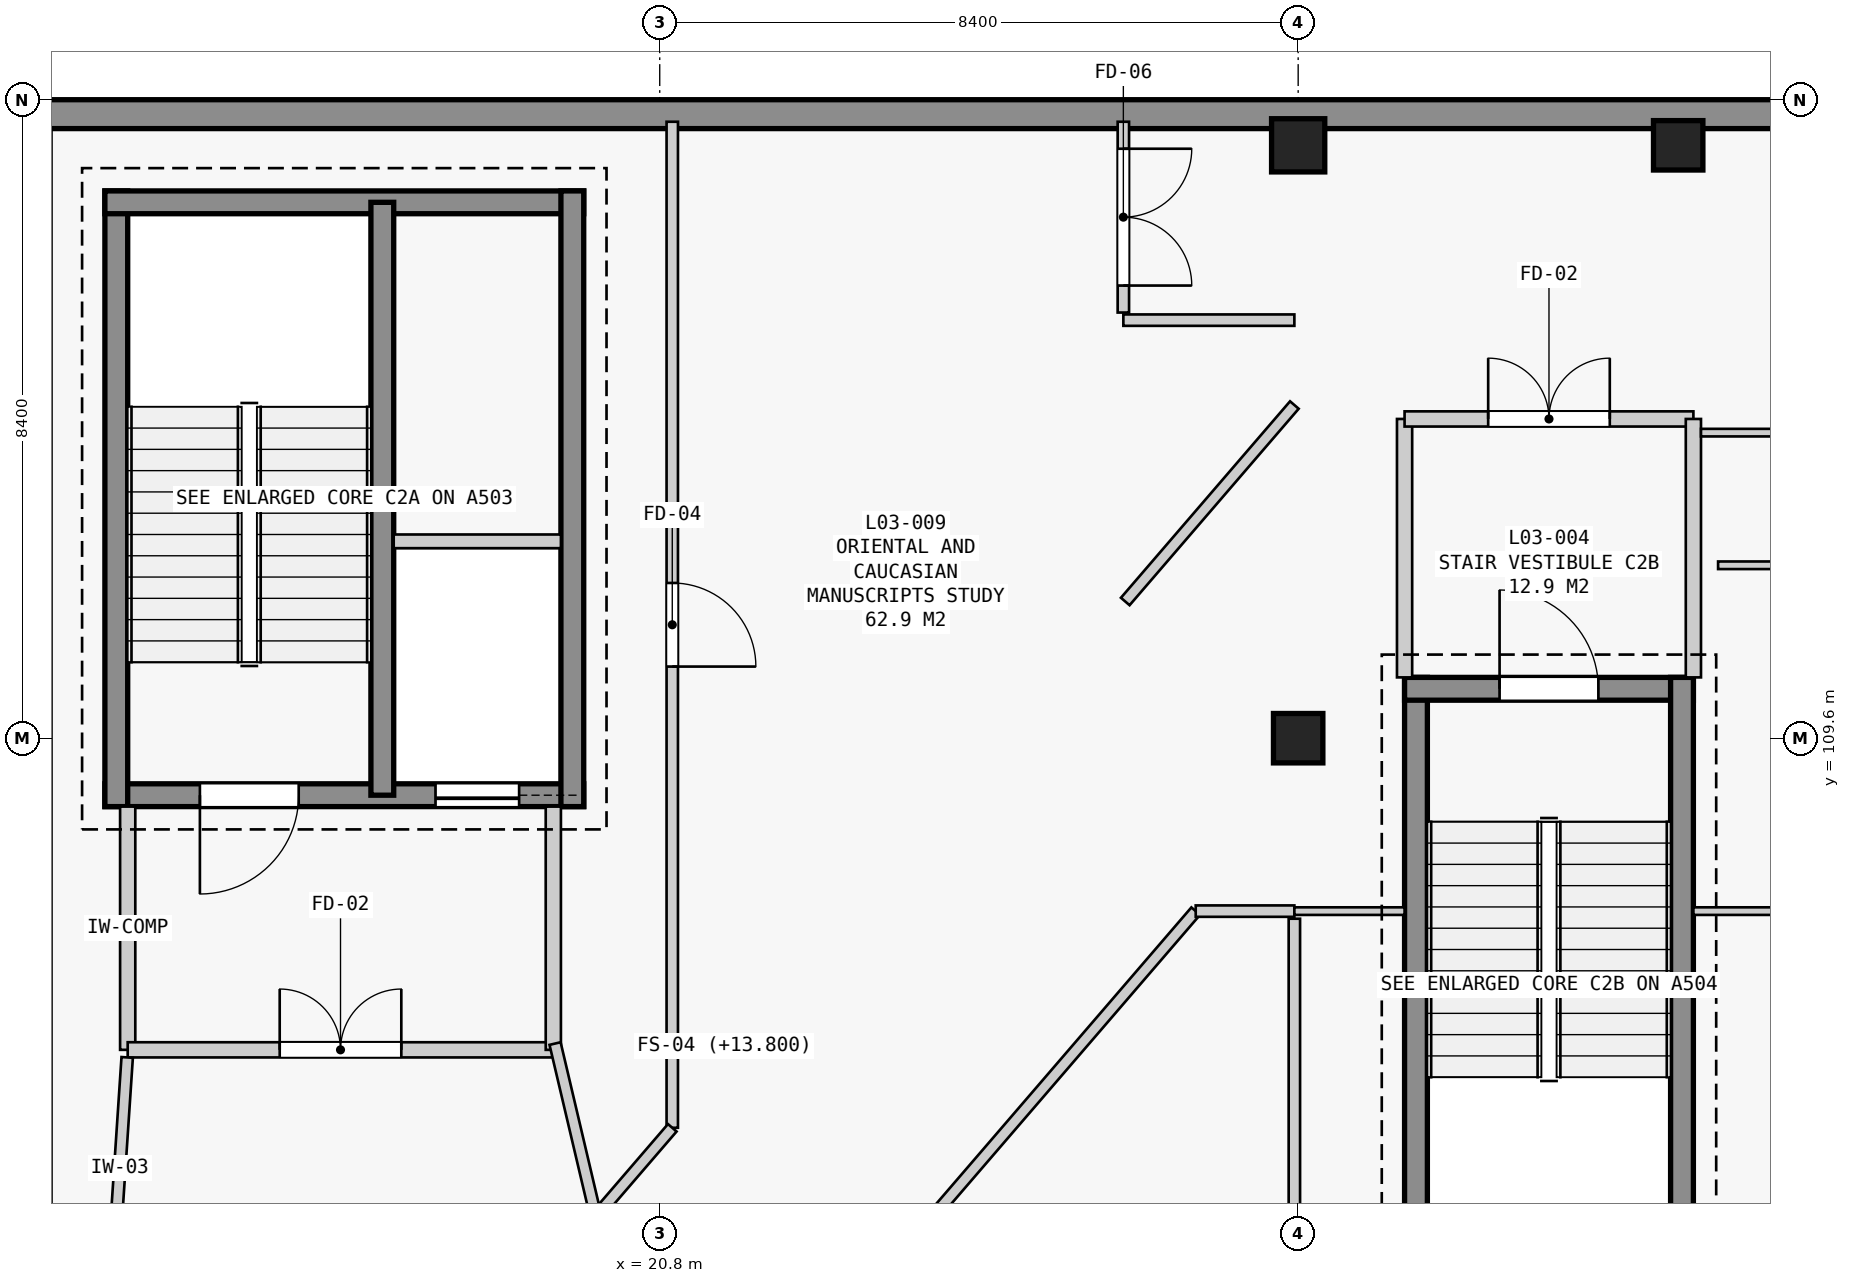
"""IFC4 building model, lengths in metres.
Left out: names, types, materials, properties, quantities, classifications, styles, units other than length and angle.
Written with IfcOpenShell. Run it as: python <this file> out.ifc"""

import sys

from ifc_helpers import new_model, si_unit, direction, frame, frame_2d, origin, origin_2d, place, context, subcontext, project, spatial, rectangle, extrude, element, fill, save


model = new_model("IFC4")
c1 = context("Model", 3, precision=1e-05, world=origin(), true_north=direction((0.0, 1.0)))
c2 = subcontext(c1, "Body", "Model", "MODEL_VIEW")
j1 = project(units=[si_unit("LENGTHUNIT", "METRE"), si_unit("PLANEANGLEUNIT", "RADIAN")], contexts=[c1])
p1 = place(None, origin())
s1 = spatial("IfcSite", under=j1, at=p1, CompositionType="ELEMENT")
p2 = place(p1, origin())
s2 = spatial("IfcBuilding", under=s1, at=p2, CompositionType="ELEMENT")
p3 = place(p2, frame((0.0, 0.0, 13.8)))
s3 = spatial("IfcBuildingStorey", under=s2, at=p3, CompositionType="ELEMENT", Elevation=13.8)
p4 = place(p3, frame((29.2, 109.6, 0.0), z_axis=(0.0, 0.0, 1.0), x_axis=(1.0, 0.0, 0.0)))
e1 = element("IfcColumn", 1, at=p4, inside=s3, PredefinedType="COLUMN", context=c2, shape_type="SweptSolid", body=[
    extrude(rectangle(XDim=0.65, YDim=0.65, at=origin_2d()), origin(), (0.0, 0.0, 1.0), 4.5),
])
p5 = place(p3, frame((29.2, 117.4, 0.0), z_axis=(0.0, 0.0, 1.0), x_axis=(1.0, 0.0, 0.0)))
e2 = element("IfcColumn", 2, at=p5, inside=s3, PredefinedType="COLUMN", context=c2, shape_type="SweptSolid", body=[
    extrude(rectangle(XDim=0.7, YDim=0.7, at=origin_2d()), origin(), (0.0, 0.0, 1.0), 4.5),
])
p6 = place(p3, frame((34.2, 117.4, 0.0), z_axis=(0.0, 0.0, 1.0), x_axis=(1.0, 0.0, 0.0)))
e3 = element("IfcColumn", 3, at=p6, inside=s3, PredefinedType="COLUMN", context=c2, shape_type="SweptSolid", body=[
    extrude(rectangle(XDim=0.65, YDim=0.65, at=origin_2d()), origin(), (0.0, 0.0, 1.0), 4.5),
])
p7 = place(p3, frame((12.59, 117.81, 0.0), z_axis=(0.0, 0.0, 1.0), x_axis=(1.0, 0.0, 0.0)))
e4 = element("IfcWall", 4, at=p7, inside=s3, PredefinedType="STANDARD", context=c2, shape_type="SweptSolid", body=[
    extrude(rectangle(XDim=33.12, YDim=0.38, at=frame_2d((16.56, 0.0))), origin(), (0.0, 0.0, 1.0), 4.18),
])
p8 = place(p3, frame((19.8, 108.85, 0.0), z_axis=(0.0, 0.0, 1.0), x_axis=(-1.0, 0.0, 0.0)))
e5 = element("IfcWall", 5, at=p8, inside=s3, PredefinedType="SHEAR", context=c2, shape_type="SweptSolid", body=[
    extrude(rectangle(XDim=6.3, YDim=0.3, at=frame_2d((3.15, 0.0))), origin(), (0.0, 0.0, 1.0), 4.18),
])
p9 = place(p8, frame((3.75, 0.0, 0.0)))
e6 = element("IfcOpeningElement", 6, at=p9, cuts=e5, PredefinedType="OPENING", context=c2, shape_type="SweptSolid", body=[
    extrude(rectangle(XDim=1.3, YDim=2.2, at=frame_2d((0.65, 1.1))), frame((0.0, 0.16, 0.0), z_axis=(0.0, -1.0, 0.0), x_axis=(1.0, 0.0, 0.0)), (0.0, 0.0, 1.0), 0.32),
])
p10 = place(p8, frame((0.85, 0.0, 0.0)))
e7 = element("IfcOpeningElement", 7, at=p10, cuts=e5, PredefinedType="OPENING", context=c2, shape_type="SweptSolid", body=[
    extrude(rectangle(XDim=1.1, YDim=2.15, at=frame_2d((0.55, 1.075))), frame((0.0, 0.16, 0.0), z_axis=(0.0, -1.0, 0.0), x_axis=(1.0, 0.0, 0.0)), (0.0, 0.0, 1.0), 0.32),
])
p11 = place(p3, frame((13.65, 108.7, 0.0), z_axis=(0.0, 0.0, 1.0), x_axis=(0.0, 1.0, 0.0)))
e8 = element("IfcWall", 8, at=p11, inside=s3, PredefinedType="SHEAR", context=c2, shape_type="SweptSolid", body=[
    extrude(rectangle(XDim=8.1, YDim=0.3, at=frame_2d((4.05, 0.0))), origin(), (0.0, 0.0, 1.0), 4.18),
])
p12 = place(p3, frame((13.5, 116.65, 0.0), z_axis=(0.0, 0.0, 1.0), x_axis=(1.0, 0.0, 0.0)))
e9 = element("IfcWall", 9, at=p12, inside=s3, PredefinedType="SHEAR", context=c2, shape_type="SweptSolid", body=[
    extrude(rectangle(XDim=6.3, YDim=0.3, at=frame_2d((3.15, 0.0))), origin(), (0.0, 0.0, 1.0), 4.18),
])
p13 = place(p3, frame((19.65, 116.8, 0.0), z_axis=(0.0, 0.0, 1.0), x_axis=(0.0, -1.0, 0.0)))
e10 = element("IfcWall", 10, at=p13, inside=s3, PredefinedType="SHEAR", context=c2, shape_type="SweptSolid", body=[
    extrude(rectangle(XDim=8.1, YDim=0.3, at=frame_2d((4.05, 0.0))), origin(), (0.0, 0.0, 1.0), 4.18),
])
p14 = place(p3, frame((17.15, 108.85, 0.0), z_axis=(0.0, 0.0, 1.0), x_axis=(0.0, 1.0, 0.0)))
e11 = element("IfcWall", 11, at=p14, inside=s3, PredefinedType="SHEAR", context=c2, shape_type="SweptSolid", body=[
    extrude(rectangle(XDim=7.8, YDim=0.3, at=frame_2d((3.9, 0.0))), origin(), (0.0, 0.0, 1.0), 4.18),
])
p15 = place(p3, frame((17.3, 112.19, 0.0), z_axis=(0.0, 0.0, 1.0), x_axis=(1.0, 0.0, 0.0)))
e12 = element("IfcWall", 12, at=p15, inside=s3, PredefinedType="PARTITIONING", context=c2, shape_type="SweptSolid", body=[
    extrude(rectangle(XDim=2.2, YDim=0.18, at=frame_2d((1.1, 0.0))), origin(), (0.0, 0.0, 1.0), 4.18),
])
p16 = place(p3, frame((13.8, 108.7, 0.0), z_axis=(0.0, 0.0, 1.0), x_axis=(0.0, -1.0, 0.0)))
e13 = element("IfcWall", 13, at=p16, inside=s3, PredefinedType="STANDARD", context=c2, shape_type="SweptSolid", body=[
    extrude(rectangle(XDim=3.2, YDim=0.2, at=frame_2d((1.6, 0.0))), origin(), (0.0, 0.0, 1.0), 4.18),
])
p17 = place(p3, frame((13.8, 105.5, 0.0), z_axis=(0.0, 0.0, 1.0), x_axis=(1.0, 0.0, 0.0)))
e14 = element("IfcWall", 14, at=p17, inside=s3, PredefinedType="STANDARD", context=c2, shape_type="SweptSolid", body=[
    extrude(rectangle(XDim=5.6, YDim=0.2, at=frame_2d((2.8, 0.0))), origin(), (0.0, 0.0, 1.0), 4.18),
])
p18 = place(p17, frame((2.0, 0.0, 0.0)))
e15 = element("IfcOpeningElement", 15, at=p18, cuts=e14, PredefinedType="OPENING", context=c2, shape_type="SweptSolid", body=[
    extrude(rectangle(XDim=1.6, YDim=2.2, at=frame_2d((0.8, 1.1))), frame((0.0, 0.11, 0.0), z_axis=(0.0, -1.0, 0.0), x_axis=(1.0, 0.0, 0.0)), (0.0, 0.0, 1.0), 0.22),
])
p19 = place(p3, frame((19.4, 105.5, 0.0), z_axis=(0.0, 0.0, 1.0), x_axis=(0.0, 1.0, 0.0)))
e16 = element("IfcWall", 16, at=p19, inside=s3, PredefinedType="STANDARD", context=c2, shape_type="SweptSolid", body=[
    extrude(rectangle(XDim=3.2, YDim=0.2, at=frame_2d((1.6, 0.0))), origin(), (0.0, 0.0, 1.0), 4.18),
])
p20 = place(p3, frame((30.75, 102.3, 0.0), z_axis=(0.0, 0.0, 1.0), x_axis=(0.0, 1.0, 0.0)))
e17 = element("IfcWall", 17, at=p20, inside=s3, PredefinedType="SHEAR", context=c2, shape_type="SweptSolid", body=[
    extrude(rectangle(XDim=8.1, YDim=0.3, at=frame_2d((4.05, 0.0))), origin(), (0.0, 0.0, 1.0), 4.18),
])
p21 = place(p3, frame((30.6, 110.25, 0.0), z_axis=(0.0, 0.0, 1.0), x_axis=(1.0, 0.0, 0.0)))
e18 = element("IfcWall", 18, at=p21, inside=s3, PredefinedType="SHEAR", context=c2, shape_type="SweptSolid", body=[
    extrude(rectangle(XDim=3.8, YDim=0.3, at=frame_2d((1.9, 0.0))), origin(), (0.0, 0.0, 1.0), 4.18),
])
p22 = place(p21, frame((1.25, 0.0, 0.0)))
e19 = element("IfcOpeningElement", 19, at=p22, cuts=e18, PredefinedType="OPENING", context=c2, shape_type="SweptSolid", body=[
    extrude(rectangle(XDim=1.3, YDim=2.2, at=frame_2d((0.65, 1.1))), frame((0.0, 0.16, 0.0), z_axis=(0.0, -1.0, 0.0), x_axis=(1.0, 0.0, 0.0)), (0.0, 0.0, 1.0), 0.32),
])
p23 = place(p3, frame((34.25, 110.4, 0.0), z_axis=(0.0, 0.0, 1.0), x_axis=(0.0, -1.0, 0.0)))
e20 = element("IfcWall", 20, at=p23, inside=s3, PredefinedType="SHEAR", context=c2, shape_type="SweptSolid", body=[
    extrude(rectangle(XDim=8.1, YDim=0.3, at=frame_2d((4.05, 0.0))), origin(), (0.0, 0.0, 1.0), 4.18),
])
p24 = place(p3, frame((30.6, 110.4, 0.0), z_axis=(0.0, 0.0, 1.0), x_axis=(0.0, 1.0, 0.0)))
e21 = element("IfcWall", 21, at=p24, inside=s3, PredefinedType="STANDARD", context=c2, shape_type="SweptSolid", body=[
    extrude(rectangle(XDim=3.4, YDim=0.2, at=frame_2d((1.7, 0.0))), origin(), (0.0, 0.0, 1.0), 4.18),
])
p25 = place(p3, frame((30.6, 113.8, 0.0), z_axis=(0.0, 0.0, 1.0), x_axis=(1.0, 0.0, 0.0)))
e22 = element("IfcWall", 22, at=p25, inside=s3, PredefinedType="STANDARD", context=c2, shape_type="SweptSolid", body=[
    extrude(rectangle(XDim=3.8, YDim=0.2, at=frame_2d((1.9, 0.0))), origin(), (0.0, 0.0, 1.0), 4.18),
])
p26 = place(p25, frame((1.1, 0.0, 0.0)))
e23 = element("IfcOpeningElement", 23, at=p26, cuts=e22, PredefinedType="OPENING", context=c2, shape_type="SweptSolid", body=[
    extrude(rectangle(XDim=1.6, YDim=2.2, at=frame_2d((0.8, 1.1))), frame((0.0, 0.11, 0.0), z_axis=(0.0, -1.0, 0.0), x_axis=(1.0, 0.0, 0.0)), (0.0, 0.0, 1.0), 0.22),
])
p27 = place(p3, frame((34.4, 113.8, 0.0), z_axis=(0.0, 0.0, 1.0), x_axis=(0.0, -1.0, 0.0)))
e24 = element("IfcWall", 24, at=p27, inside=s3, PredefinedType="STANDARD", context=c2, shape_type="SweptSolid", body=[
    extrude(rectangle(XDim=3.4, YDim=0.2, at=frame_2d((1.7, 0.0))), origin(), (0.0, 0.0, 1.0), 4.18),
])
p28 = place(p3, frame((19.96, 103.307, 0.0), z_axis=(0.0, 0.0, 1.0), x_axis=(-0.229592143179, 0.973286929837, 0.0)))
e25 = element("IfcWall", 25, at=p28, inside=s3, PredefinedType="PARTITIONING", context=c2, shape_type="SweptSolid", body=[
    extrude(rectangle(XDim=2.338, YDim=0.15, at=frame_2d((1.169, 0.0))), origin(), (0.0, 0.0, 1.0), 4.18),
])
p29 = place(p3, frame((13.793, 105.4, 0.0), z_axis=(0.0, 0.0, 1.0), x_axis=(-0.066440960793, -0.997790358106, 0.0)))
e26 = element("IfcWall", 26, at=p29, inside=s3, PredefinedType="PARTITIONING", context=c2, shape_type="SweptSolid", body=[
    extrude(rectangle(XDim=2.906, YDim=0.15, at=frame_2d((1.453, 0.0))), origin(), (0.0, 0.0, 1.0), 4.18),
])
p30 = place(p3, frame((20.965, 117.71, 0.0), z_axis=(0.0, 0.0, 1.0), x_axis=(0.0, -1.0, 0.0)))
e27 = element("IfcWall", 27, at=p30, inside=s3, PredefinedType="PARTITIONING", context=c2, shape_type="SweptSolid", body=[
    extrude(rectangle(XDim=13.235, YDim=0.15, at=frame_2d((6.618, 0.0))), origin(), (0.0, 0.0, 1.0), 4.18),
])
p31 = place(p30, frame((6.068, 0.0, 0.0)))
e28 = element("IfcOpeningElement", 28, at=p31, cuts=e27, PredefinedType="OPENING", context=c2, shape_type="SweptSolid", body=[
    extrude(rectangle(XDim=1.1, YDim=2.15, at=frame_2d((0.55, 1.075))), frame((0.0, 0.085, 0.0), z_axis=(0.0, -1.0, 0.0), x_axis=(1.0, 0.0, 0.0)), (0.0, 0.0, 1.0), 0.17),
])
p32 = place(p3, frame((20.965, 104.475, 0.0), z_axis=(0.0, 0.0, 1.0), x_axis=(-0.652368947126, -0.75790154824, 0.0)))
e29 = element("IfcWall", 29, at=p32, inside=s3, PredefinedType="PARTITIONING", context=c2, shape_type="SweptSolid", body=[
    extrude(rectangle(XDim=1.541, YDim=0.15, at=frame_2d((0.771, 0.0))), origin(), (0.0, 0.0, 1.0), 4.18),
])
p33 = place(p3, frame((23.165, 101.88, 0.0), z_axis=(0.0, 0.0, 1.0), x_axis=(0.652376770796, 0.757894813893, 0.0)))
e30 = element("IfcWall", 30, at=p33, inside=s3, PredefinedType="PARTITIONING", context=c2, shape_type="SweptSolid", body=[
    extrude(rectangle(XDim=7.184, YDim=0.15, at=frame_2d((3.592, 0.0))), origin(), (0.0, 0.0, 1.0), 4.18),
])
p34 = place(p3, frame((27.852, 107.325, 0.0), z_axis=(0.0, 0.0, 1.0), x_axis=(1.0, 0.0, 0.0)))
e31 = element("IfcWall", 31, at=p34, inside=s3, PredefinedType="PARTITIONING", context=c2, shape_type="SweptSolid", body=[
    extrude(rectangle(XDim=1.298, YDim=0.15, at=frame_2d((0.649, 0.0))), origin(), (0.0, 0.0, 1.0), 3.46),
])
p35 = place(p3, frame((29.15, 107.225, 0.0), z_axis=(0.0, 0.0, 1.0), x_axis=(0.0, -1.0, 0.0)))
e32 = element("IfcWall", 32, at=p35, inside=s3, PredefinedType="PARTITIONING", context=c2, shape_type="SweptSolid", body=[
    extrude(rectangle(XDim=16.535, YDim=0.15, at=frame_2d((8.268, 0.0))), origin(), (0.0, 0.0, 1.0), 3.26),
])
p36 = place(p35, frame((8.417, 0.0, 0.0)))
e33 = element("IfcOpeningElement", 33, at=p36, cuts=e32, PredefinedType="OPENING", context=c2, shape_type="SweptSolid", body=[
    extrude(rectangle(XDim=1.1, YDim=2.15, at=frame_2d((0.55, 1.075))), frame((0.0, 0.085, 0.0), z_axis=(0.0, -1.0, 0.0), x_axis=(1.0, 0.0, 0.0)), (0.0, 0.0, 1.0), 0.17),
])
p37 = place(p3, frame((26.9, 115.1, 0.0), z_axis=(0.0, 0.0, 1.0), x_axis=(1.0, 0.0, 0.0)))
e34 = element("IfcWall", 34, at=p37, inside=s3, PredefinedType="PARTITIONING", context=c2, shape_type="SweptSolid", body=[
    extrude(rectangle(XDim=2.25, YDim=0.15, at=frame_2d((1.125, 0.0))), origin(), (0.0, 0.0, 1.0), 3.41),
])
p38 = place(p3, frame((29.15, 113.983, 0.0), z_axis=(0.0, 0.0, 1.0), x_axis=(-0.652340430993, -0.757926092764, 0.0)))
e35 = element("IfcWall", 35, at=p38, inside=s3, PredefinedType="PARTITIONING", context=c2, shape_type="SweptSolid", body=[
    extrude(rectangle(XDim=3.411, YDim=0.15, at=frame_2d((1.705, 0.0))), origin(), (0.0, 0.0, 1.0), 3.41),
])
p39 = place(p3, frame((26.9, 117.71, 0.0), z_axis=(0.0, 0.0, 1.0), x_axis=(0.0, -1.0, 0.0)))
e36 = element("IfcWall", 36, at=p39, inside=s3, PredefinedType="PARTITIONING", context=c2, shape_type="SweptSolid", body=[
    extrude(rectangle(XDim=2.51, YDim=0.15, at=frame_2d((1.255, 0.0))), origin(), (0.0, 0.0, 1.0), 4.18),
])
p40 = place(p39, frame((0.355, 0.0, 0.0)))
e37 = element("IfcOpeningElement", 37, at=p40, cuts=e36, PredefinedType="OPENING", context=c2, shape_type="SweptSolid", body=[
    extrude(rectangle(XDim=1.8, YDim=2.2, at=frame_2d((0.9, 1.1))), frame((0.0, 0.085, 0.0), z_axis=(0.0, -1.0, 0.0), x_axis=(1.0, 0.0, 0.0)), (0.0, 0.0, 1.0), 0.17),
])
p41 = place(p3, frame((34.5, 113.62, 0.0), z_axis=(0.0, 0.0, 1.0), x_axis=(1.0, 0.0, 0.0)))
e38 = element("IfcWall", 38, at=p41, inside=s3, PredefinedType="PARTITIONING", context=c2, shape_type="SweptSolid", body=[
    extrude(rectangle(XDim=2.835, YDim=0.1, at=frame_2d((1.417, 0.0))), origin(), (0.0, 0.0, 1.0), 3.37),
])
p42 = place(p3, frame((37.235, 111.875, 0.0), z_axis=(0.0, 0.0, 1.0), x_axis=(-1.0, 0.0, 0.0)))
e39 = element("IfcWall", 39, at=p42, inside=s3, PredefinedType="PARTITIONING", context=c2, shape_type="SweptSolid", body=[
    extrude(rectangle(XDim=2.51, YDim=0.1, at=frame_2d((1.255, 0.0))), origin(), (0.0, 0.0, 1.0), 3.37),
])
p43 = place(p3, frame((34.4, 107.325, 0.0), z_axis=(0.0, 0.0, 1.0), x_axis=(1.0, 0.0, 0.0)))
e40 = element("IfcWall", 40, at=p43, inside=s3, PredefinedType="PARTITIONING", context=c2, shape_type="SweptSolid", body=[
    extrude(rectangle(XDim=2.935, YDim=0.1, at=frame_2d((1.468, 0.0))), origin(), (0.0, 0.0, 1.0), 3.42),
])
p44 = place(p3, frame((29.15, 107.325, 0.0), z_axis=(0.0, 0.0, 1.0), x_axis=(1.0, 0.0, 0.0)))
e41 = element("IfcWall", 41, at=p44, inside=s3, PredefinedType="PARTITIONING", context=c2, shape_type="SweptSolid", body=[
    extrude(rectangle(XDim=1.45, YDim=0.1, at=frame_2d((0.725, 0.0))), origin(), (0.0, 0.0, 1.0), 3.46),
])
p45 = place(p9, origin())
e42 = element("IfcDoor", 42, at=p45, inside=s3, OperationType="SINGLE_SWING_RIGHT", PredefinedType="DOOR", context=c2, shape_type="SweptSolid", body=[
    extrude(rectangle(XDim=1.3, YDim=2.2, at=frame_2d((0.65, 1.1))), frame((0.0, 0.025, 0.0), z_axis=(0.0, -1.0, 0.0), x_axis=(1.0, 0.0, 0.0)), (0.0, 0.0, 1.0), 0.05),
])
fill(e6, e42)
p46 = place(p10, origin())
e43 = element("IfcDoor", 43, at=p46, inside=s3, OperationType="SLIDING_TO_LEFT", PredefinedType="DOOR", context=c2, shape_type="SweptSolid", body=[
    extrude(rectangle(XDim=1.1, YDim=2.15, at=frame_2d((0.55, 1.075))), frame((0.0, 0.025, 0.0), z_axis=(0.0, -1.0, 0.0), x_axis=(1.0, 0.0, 0.0)), (0.0, 0.0, 1.0), 0.05),
])
fill(e7, e43)
p47 = place(p22, origin())
e44 = element("IfcDoor", 44, at=p47, inside=s3, OperationType="SINGLE_SWING_LEFT", PredefinedType="DOOR", context=c2, shape_type="SweptSolid", body=[
    extrude(rectangle(XDim=1.3, YDim=2.2, at=frame_2d((0.65, 1.1))), frame((0.0, 0.025, 0.0), z_axis=(0.0, -1.0, 0.0), x_axis=(1.0, 0.0, 0.0)), (0.0, 0.0, 1.0), 0.05),
])
fill(e19, e44)
p48 = place(p18, origin())
e45 = element("IfcDoor", 45, at=p48, inside=s3, OperationType="DOUBLE_DOOR_SINGLE_SWING", PredefinedType="DOOR", context=c2, shape_type="SweptSolid", body=[
    extrude(rectangle(XDim=1.6, YDim=2.2, at=frame_2d((0.8, 1.1))), frame((0.0, 0.025, 0.0), z_axis=(0.0, -1.0, 0.0), x_axis=(1.0, 0.0, 0.0)), (0.0, 0.0, 1.0), 0.05),
])
fill(e15, e45)
p49 = place(p26, origin())
e46 = element("IfcDoor", 46, at=p49, inside=s3, OperationType="DOUBLE_DOOR_SINGLE_SWING", PredefinedType="DOOR", context=c2, shape_type="SweptSolid", body=[
    extrude(rectangle(XDim=1.6, YDim=2.2, at=frame_2d((0.8, 1.1))), frame((0.0, 0.025, 0.0), z_axis=(0.0, -1.0, 0.0), x_axis=(1.0, 0.0, 0.0)), (0.0, 0.0, 1.0), 0.05),
])
fill(e23, e46)
p50 = place(p31, origin())
e47 = element("IfcDoor", 47, at=p50, inside=s3, OperationType="SINGLE_SWING_RIGHT", PredefinedType="DOOR", context=c2, shape_type="SweptSolid", body=[
    extrude(rectangle(XDim=1.1, YDim=2.15, at=frame_2d((0.55, 1.075))), frame((0.0, 0.025, 0.0), z_axis=(0.0, -1.0, 0.0), x_axis=(1.0, 0.0, 0.0)), (0.0, 0.0, 1.0), 0.05),
])
fill(e28, e47)
p51 = place(p40, origin())
e48 = element("IfcDoor", 48, at=p51, inside=s3, OperationType="DOUBLE_DOOR_SINGLE_SWING", PredefinedType="DOOR", context=c2, shape_type="SweptSolid", body=[
    extrude(rectangle(XDim=1.8, YDim=2.2, at=frame_2d((0.9, 1.1))), frame((0.0, 0.025, 0.0), z_axis=(0.0, -1.0, 0.0), x_axis=(1.0, 0.0, 0.0)), (0.0, 0.0, 1.0), 0.05),
])
fill(e37, e48)
save(model, sys.argv[1])
